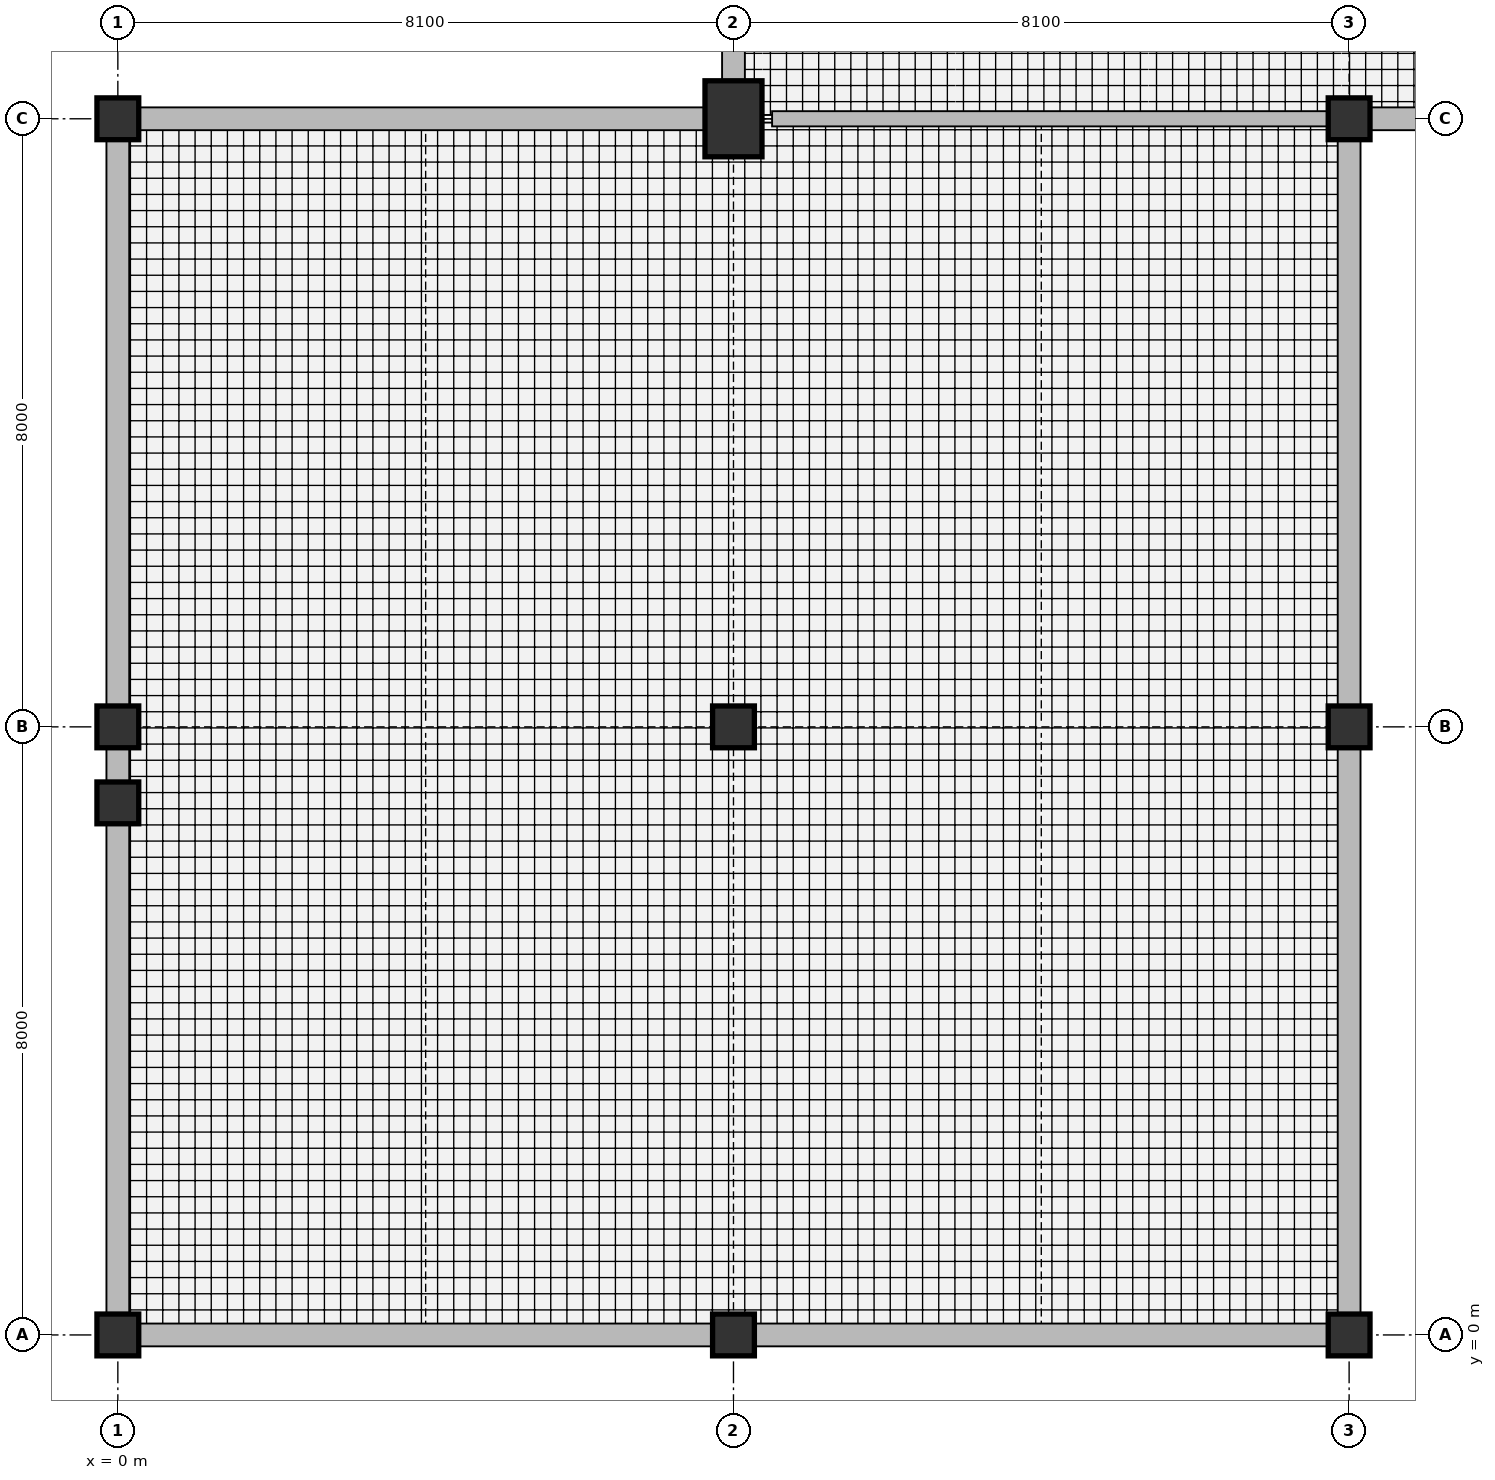
"""IFC4 building model, lengths in metres.
Left out: names, types, materials, properties, quantities, classifications, styles, units other than length and angle.
Written with IfcOpenShell. Run it as: python <this file> out.ifc"""

import sys

from ifc_helpers import new_model, si_unit, direction, frame, frame_2d, origin, origin_with_axes, origin_2d, place, context, subcontext, project, spatial, rectangle, extrude, element, fill, save


model = new_model("IFC4")
c1 = context("Model", 3, precision=1e-05, world=origin(), true_north=direction((0.0, 1.0)))
c2 = subcontext(c1, "Body", "Model", "MODEL_VIEW")
j1 = project(units=[si_unit("LENGTHUNIT", "METRE"), si_unit("PLANEANGLEUNIT", "RADIAN")], contexts=[c1])
p1 = place(None, origin())
s1 = spatial("IfcSite", under=j1, at=p1, CompositionType="ELEMENT")
p2 = place(p1, origin())
s2 = spatial("IfcBuilding", under=s1, at=p2, CompositionType="ELEMENT")
p3 = place(p2, frame((0.0, 0.0, 5.4)))
s3 = spatial("IfcBuildingStorey", under=s2, at=p3, CompositionType="ELEMENT", Elevation=5.4)
for number, where, z_axis, x_axis in (
    (1, (0.0, 0.0, 0.0), (0.0, 0.0, 1.0), (1.0, 0.0, 0.0)),
    (2, (0.0, 7.0, 0.0), (0.0, 0.0, 1.0), (1.0, 0.0, 0.0)),
    (3, (0.0, 8.0, 0.0), (0.0, 0.0, 1.0), (1.0, 0.0, 0.0)),
    (4, (0.0, 16.0, 0.0), (0.0, 0.0, 1.0), (1.0, 0.0, 0.0)),
    (5, (8.1, 0.0, 0.0), (0.0, 0.0, 1.0), (1.0, 0.0, 0.0)),
    (6, (8.1, 8.0, 0.0), (0.0, 0.0, 1.0), (1.0, 0.0, 0.0)),
):
    element("IfcColumn", number, at=place(p3, frame(where, z_axis=z_axis, x_axis=x_axis)), inside=s3, PredefinedType="COLUMN", context=c2, shape_type="SweptSolid", body=[
        extrude(rectangle(XDim=0.55, YDim=0.55, at=origin_2d()), origin(), (0.0, 0.0, 1.0), 4.8),
    ])
p4 = place(p3, frame((8.1, 16.0, 0.0), z_axis=(0.0, 0.0, 1.0), x_axis=(1.0, 0.0, 0.0)))
e7 = element("IfcColumn", 7, at=p4, inside=s3, PredefinedType="COLUMN", context=c2, shape_type="SweptSolid", body=[
    extrude(rectangle(XDim=0.75, YDim=1.0, at=origin_2d()), origin(), (0.0, 0.0, 1.0), 4.8),
])
for number, where, z_axis, x_axis in (
    (8, (16.2, 0.0, 0.0), (0.0, 0.0, 1.0), (1.0, 0.0, 0.0)),
    (9, (16.2, 8.0, 0.0), (0.0, 0.0, 1.0), (1.0, 0.0, 0.0)),
    (10, (16.2, 16.0, 0.0), (0.0, 0.0, 1.0), (1.0, 0.0, 0.0)),
):
    element("IfcColumn", number, at=place(p3, frame(where, z_axis=z_axis, x_axis=x_axis)), inside=s3, PredefinedType="COLUMN", context=c2, shape_type="SweptSolid", body=[
        extrude(rectangle(XDim=0.55, YDim=0.55, at=origin_2d()), origin(), (0.0, 0.0, 1.0), 4.8),
    ])
p5 = place(p3, frame((0.0, 16.0, 0.0), z_axis=(0.0, 0.0, 1.0), x_axis=(0.0, -1.0, 0.0)))
e11 = element("IfcWall", 11, at=p5, inside=s3, PredefinedType="SOLIDWALL", context=c2, shape_type="SweptSolid", body=[
    extrude(rectangle(XDim=16.0, YDim=0.3, at=frame_2d((8.0, 0.0))), origin(), (0.0, 0.0, 1.0), 3.912),
])
p6 = place(p5, frame((4.05, 0.0, 0.95)))
e12 = element("IfcOpeningElement", 12, at=p6, cuts=e11, PredefinedType="OPENING", context=c2, shape_type="SweptSolid", body=[
    extrude(rectangle(XDim=2.7, YDim=1.8, at=frame_2d((1.35, 0.9))), frame((0.0, 0.16, 0.0), z_axis=(0.0, -1.0, 0.0), x_axis=(1.0, 0.0, 0.0)), (0.0, 0.0, 1.0), 0.32),
])
p7 = place(p3, origin_with_axes())
e13 = element("IfcWall", 13, at=p7, inside=s3, PredefinedType="SOLIDWALL", context=c2, shape_type="SweptSolid", body=[
    extrude(rectangle(XDim=16.2, YDim=0.3, at=frame_2d((8.1, 0.0))), origin(), (0.0, 0.0, 1.0), 3.812),
])
p8 = place(p7, frame((4.05, 0.0, 0.85)))
e14 = element("IfcOpeningElement", 14, at=p8, cuts=e13, PredefinedType="OPENING", context=c2, shape_type="SweptSolid", body=[
    extrude(rectangle(XDim=2.7, YDim=2.1, at=frame_2d((1.35, 1.05))), frame((0.0, 0.16, 0.0), z_axis=(0.0, -1.0, 0.0), x_axis=(1.0, 0.0, 0.0)), (0.0, 0.0, 1.0), 0.32),
])
p9 = place(p3, frame((16.2, 0.0, 0.0), z_axis=(0.0, 0.0, 1.0), x_axis=(0.0, 1.0, 0.0)))
e15 = element("IfcWall", 15, at=p9, inside=s3, PredefinedType="SOLIDWALL", context=c2, shape_type="SweptSolid", body=[
    extrude(rectangle(XDim=16.0, YDim=0.3, at=frame_2d((8.0, 0.0))), origin(), (0.0, 0.0, 1.0), 3.912),
])
p10 = place(p3, frame((16.2, 16.0, 0.0), z_axis=(0.0, 0.0, 1.0), x_axis=(1.0, 0.0, 0.0)))
e16 = element("IfcWall", 16, at=p10, inside=s3, PredefinedType="SOLIDWALL", context=c2, shape_type="SweptSolid", body=[
    extrude(rectangle(XDim=16.2, YDim=0.3, at=frame_2d((8.1, 0.0))), origin(), (0.0, 0.0, 1.0), 3.812),
])
p11 = place(p3, frame((8.1, 25.0, 0.0), z_axis=(0.0, 0.0, 1.0), x_axis=(0.0, -1.0, 0.0)))
e17 = element("IfcWall", 17, at=p11, inside=s3, PredefinedType="SOLIDWALL", context=c2, shape_type="SweptSolid", body=[
    extrude(rectangle(XDim=9.0, YDim=0.3, at=frame_2d((4.5, 0.0))), origin(), (0.0, 0.0, 1.0), 3.312),
])
p12 = place(p11, frame((3.6, 0.0, 0.95)))
e18 = element("IfcOpeningElement", 18, at=p12, cuts=e17, PredefinedType="OPENING", context=c2, shape_type="SweptSolid", body=[
    extrude(rectangle(XDim=1.8, YDim=1.8, at=frame_2d((0.9, 0.9))), frame((0.0, 0.16, 0.0), z_axis=(0.0, -1.0, 0.0), x_axis=(1.0, 0.0, 0.0)), (0.0, 0.0, 1.0), 0.32),
])
p13 = place(p3, frame((8.1, 16.0, 0.0), z_axis=(0.0, 0.0, 1.0), x_axis=(-1.0, 0.0, 0.0)))
e19 = element("IfcWall", 19, at=p13, inside=s3, PredefinedType="SOLIDWALL", context=c2, shape_type="SweptSolid", body=[
    extrude(rectangle(XDim=8.1, YDim=0.3, at=frame_2d((4.05, 0.0))), origin(), (0.0, 0.0, 1.0), 3.812),
])
p14 = place(p13, frame((3.15, 0.0, 0.85)))
e20 = element("IfcOpeningElement", 20, at=p14, cuts=e19, PredefinedType="OPENING", context=c2, shape_type="SweptSolid", body=[
    extrude(rectangle(XDim=1.8, YDim=2.1, at=frame_2d((0.9, 1.05))), frame((0.0, 0.16, 0.0), z_axis=(0.0, -1.0, 0.0), x_axis=(1.0, 0.0, 0.0)), (0.0, 0.0, 1.0), 0.32),
])
p15 = place(p3, frame((16.6, 12.35, 1.2), z_axis=(0.0, 0.0, 1.0), x_axis=(1.0, 0.0, 0.0)))
e21 = element("IfcWall", 21, at=p15, inside=s3, PredefinedType="PARAPET", context=c2, shape_type="SweptSolid", body=[
    extrude(rectangle(XDim=47.9, YDim=0.22, at=frame_2d((23.95, 0.0))), origin(), (0.0, 0.0, 1.0), 0.55),
])
p16 = place(p3, frame((16.47, 12.48, 1.2), z_axis=(0.0, 0.0, 1.0), x_axis=(0.0, 1.0, 0.0)))
e22 = element("IfcWall", 22, at=p16, inside=s3, PredefinedType="PARAPET", context=c2, shape_type="SweptSolid", body=[
    extrude(rectangle(XDim=3.32, YDim=0.22, at=frame_2d((1.66, 0.0))), origin(), (0.0, 0.0, 1.0), 0.55),
])
p17 = place(p3, frame((8.608, 16.0, 0.0), z_axis=(0.0, 0.0, 1.0), x_axis=(1.0, 0.0, 0.0)))
e23 = element("IfcWall", 23, at=p17, inside=s3, PredefinedType="PARTITIONING", context=c2, shape_type="SweptSolid", body=[
    extrude(rectangle(XDim=7.309, YDim=0.2, at=frame_2d((3.655, 0.0))), origin(), (0.0, 0.0, 1.0), 3.812),
])
p18 = place(p17, frame((3.155, 0.0, 0.0)))
e24 = element("IfcOpeningElement", 24, at=p18, cuts=e23, PredefinedType="OPENING", context=c2, shape_type="SweptSolid", body=[
    extrude(rectangle(XDim=1.0, YDim=2.2, at=frame_2d((0.5, 1.1))), frame((0.0, 0.11, 0.0), z_axis=(0.0, -1.0, 0.0), x_axis=(1.0, 0.0, 0.0)), (0.0, 0.0, 1.0), 0.22),
])
p19 = place(p6, origin())
e25 = element("IfcWindow", 25, at=p19, inside=s3, PartitioningType="TRIPLE_PANEL_VERTICAL", PredefinedType="WINDOW", context=c2, shape_type="SweptSolid", body=[
    extrude(rectangle(XDim=2.7, YDim=1.8, at=frame_2d((1.35, 0.9))), frame((0.0, 0.03, 0.0), z_axis=(0.0, -1.0, 0.0), x_axis=(1.0, 0.0, 0.0)), (0.0, 0.0, 1.0), 0.06),
])
fill(e12, e25)
p20 = place(p8, origin())
e26 = element("IfcWindow", 26, at=p20, inside=s3, PartitioningType="TRIPLE_PANEL_VERTICAL", PredefinedType="WINDOW", context=c2, shape_type="SweptSolid", body=[
    extrude(rectangle(XDim=2.7, YDim=2.1, at=frame_2d((1.35, 1.05))), frame((0.0, 0.03, 0.0), z_axis=(0.0, -1.0, 0.0), x_axis=(1.0, 0.0, 0.0)), (0.0, 0.0, 1.0), 0.06),
])
fill(e14, e26)
p21 = place(p14, origin())
e27 = element("IfcWindow", 27, at=p21, inside=s3, PartitioningType="DOUBLE_PANEL_VERTICAL", PredefinedType="WINDOW", context=c2, shape_type="SweptSolid", body=[
    extrude(rectangle(XDim=1.8, YDim=2.1, at=frame_2d((0.9, 1.05))), frame((0.0, 0.03, 0.0), z_axis=(0.0, -1.0, 0.0), x_axis=(1.0, 0.0, 0.0)), (0.0, 0.0, 1.0), 0.06),
])
fill(e20, e27)
p22 = place(p18, frame((1.0, 0.0, 0.0), z_axis=(0.0, 0.0, 1.0), x_axis=(-1.0, 0.0, 0.0)))
e28 = element("IfcDoor", 28, at=p22, inside=s3, OperationType="SINGLE_SWING_LEFT", PredefinedType="DOOR", context=c2, shape_type="SweptSolid", body=[
    extrude(rectangle(XDim=1.0, YDim=2.2, at=frame_2d((0.5, 1.1))), frame((0.0, 0.025, 0.0), z_axis=(0.0, -1.0, 0.0), x_axis=(1.0, 0.0, 0.0)), (0.0, 0.0, 1.0), 0.05),
])
fill(e24, e28)
save(model, sys.argv[1])
